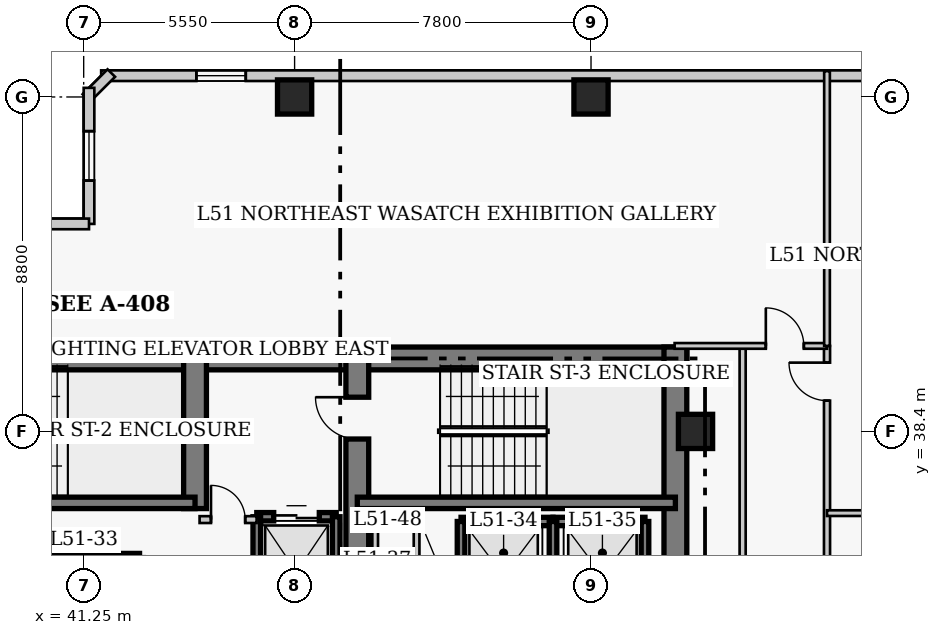
"""IFC4 building model, lengths in metres.
Left out: names, types, materials, properties, quantities, classifications, styles, units other than length and angle.
Written with IfcOpenShell. Run it as: python <this file> out.ifc"""

import sys

from ifc_helpers import new_model, si_unit, direction, frame, frame_2d, origin, origin_2d, place, context, subcontext, project, spatial, rectangle, extrude, element, fill, save


model = new_model("IFC4")
c1 = context("Model", 3, precision=1e-05, world=origin(), true_north=direction((0.0, 1.0)))
c2 = subcontext(c1, "Body", "Model", "MODEL_VIEW")
j1 = project(units=[si_unit("LENGTHUNIT", "METRE"), si_unit("PLANEANGLEUNIT", "RADIAN")], contexts=[c1])
p1 = place(None, origin())
s1 = spatial("IfcSite", under=j1, at=p1, CompositionType="ELEMENT")
p2 = place(p1, origin())
s2 = spatial("IfcBuilding", under=s1, at=p2, CompositionType="ELEMENT")
p3 = place(p2, frame((0.0, 0.0, 204.6)))
s3 = spatial("IfcBuildingStorey", under=s2, at=p3, CompositionType="ELEMENT", Elevation=204.6)
p4 = place(p3, frame((35.85, 40.32, 0.0), z_axis=(0.0, 0.0, 1.0), x_axis=(1.0, 0.0, 0.0)))
e1 = element("IfcWall", 1, at=p4, inside=s3, PredefinedType="SHEAR", context=c2, shape_type="SweptSolid", body=[
    extrude(rectangle(XDim=12.6, YDim=0.6, at=frame_2d((6.3, 0.0))), origin(), (0.0, 0.0, 1.0), 3.9),
])
p5 = place(p3, frame((48.45, 40.32, 0.0), z_axis=(0.0, 0.0, 1.0), x_axis=(1.0, 0.0, 0.0)))
e2 = element("IfcWall", 2, at=p5, inside=s3, PredefinedType="SHEAR", context=c2, shape_type="SweptSolid", body=[
    extrude(rectangle(XDim=8.67, YDim=0.6, at=frame_2d((4.335, 0.0))), origin(), (0.0, 0.0, 1.0), 3.9),
])
p6 = place(p3, frame((56.82, 27.05, 0.0), z_axis=(0.0, 0.0, 1.0), x_axis=(0.0, 1.0, 0.0)))
e3 = element("IfcWall", 3, at=p6, inside=s3, PredefinedType="SHEAR", context=c2, shape_type="SweptSolid", body=[
    extrude(rectangle(XDim=13.57, YDim=0.6, at=frame_2d((6.785, 0.0))), origin(), (0.0, 0.0, 1.0), 3.9),
])
p7 = place(p3, frame((44.18, 36.37, 0.0), z_axis=(0.0, 0.0, 1.0), x_axis=(0.0, 1.0, 0.0)))
e4 = element("IfcWall", 4, at=p7, inside=s3, PredefinedType="SHEAR", context=c2, shape_type="SweptSolid", body=[
    extrude(rectangle(XDim=3.95, YDim=0.6, at=frame_2d((1.975, 0.0))), origin(), (0.0, 0.0, 1.0), 3.9),
])
p8 = place(p3, frame((48.45, 32.45, 0.0), z_axis=(0.0, 0.0, 1.0), x_axis=(0.0, 1.0, 0.0)))
e5 = element("IfcWall", 5, at=p8, inside=s3, PredefinedType="SHEAR", context=c2, shape_type="SweptSolid", body=[
    extrude(rectangle(XDim=7.87, YDim=0.6, at=frame_2d((3.935, 0.0))), origin(), (0.0, 0.0, 1.0), 3.9),
])
p9 = place(p8, frame((5.75, 0.0, 0.0)))
e6 = element("IfcOpeningElement", 6, at=p9, cuts=e5, PredefinedType="OPENING", context=c2, shape_type="SweptSolid", body=[
    extrude(rectangle(XDim=1.1, YDim=2.15, at=frame_2d((0.55, 1.075))), frame((0.0, 0.31, 0.0), z_axis=(0.0, -1.0, 0.0), x_axis=(1.0, 0.0, 0.0)), (0.0, 0.0, 1.0), 0.62),
])
p10 = place(p3, frame((35.85, 36.52, 0.0), z_axis=(0.0, 0.0, 1.0), x_axis=(1.0, 0.0, 0.0)))
e7 = element("IfcWall", 7, at=p10, inside=s3, PredefinedType="SHEAR", context=c2, shape_type="SweptSolid", body=[
    extrude(rectangle(XDim=8.33, YDim=0.3, at=frame_2d((4.165, 0.0))), origin(), (0.0, 0.0, 1.0), 3.9),
])
p11 = place(p3, frame((48.45, 36.52, 0.0), z_axis=(0.0, 0.0, 1.0), x_axis=(1.0, 0.0, 0.0)))
e8 = element("IfcWall", 8, at=p11, inside=s3, PredefinedType="SHEAR", context=c2, shape_type="SweptSolid", body=[
    extrude(rectangle(XDim=8.37, YDim=0.3, at=frame_2d((4.185, 0.0))), origin(), (0.0, 0.0, 1.0), 3.9),
])
for number, where, z_axis, x_axis in (
    (9, (46.8, 47.2, 0.0), (0.0, 0.0, 1.0), (1.0, 0.0, 0.0)),
    (10, (54.6, 47.2, 0.0), (0.0, 0.0, 1.0), (1.0, 0.0, 0.0)),
    (11, (57.35, 38.4, 0.0), (0.0, 0.0, 1.0), (1.0, 0.0, 0.0)),
):
    element("IfcColumn", number, at=place(p3, frame(where, z_axis=z_axis, x_axis=x_axis)), inside=s3, PredefinedType="COLUMN", context=c2, shape_type="SweptSolid", body=[
        extrude(rectangle(XDim=0.9, YDim=0.9, at=origin_2d()), origin(), (0.0, 0.0, 1.0), 3.9),
    ])
p12 = place(p3, frame((67.54, 47.76, 0.0), z_axis=(0.0, 0.0, 1.0), x_axis=(-1.0, 0.0, 0.0)))
e12 = element("IfcWall", 12, at=p12, inside=s3, PredefinedType="SOLIDWALL", context=c2, shape_type="SweptSolid", body=[
    extrude(rectangle(XDim=25.83, YDim=0.28, at=frame_2d((12.915, 0.0))), origin(), (0.0, 0.0, 1.0), 3.65),
])
p13 = place(p12, frame((3.655, 0.0, 0.85)))
e13 = element("IfcOpeningElement", 13, at=p13, cuts=e12, PredefinedType="OPENING", context=c2, shape_type="SweptSolid", body=[
    extrude(rectangle(XDim=1.3, YDim=1.7, at=frame_2d((0.65, 0.85))), frame((0.0, 0.15, 0.0), z_axis=(0.0, -1.0, 0.0), x_axis=(1.0, 0.0, 0.0)), (0.0, 0.0, 1.0), 0.3),
])
p14 = place(p12, frame((22.025, 0.0, 0.85)))
e14 = element("IfcOpeningElement", 14, at=p14, cuts=e12, PredefinedType="OPENING", context=c2, shape_type="SweptSolid", body=[
    extrude(rectangle(XDim=1.3, YDim=1.7, at=frame_2d((0.65, 0.85))), frame((0.0, 0.15, 0.0), z_axis=(0.0, -1.0, 0.0), x_axis=(1.0, 0.0, 0.0)), (0.0, 0.0, 1.0), 0.3),
])
p15 = place(p3, frame((41.977, 47.829, 0.0), z_axis=(0.0, 0.0, 1.0), x_axis=(-0.706975312048, -0.707238225886, 0.0)))
e15 = element("IfcWall", 15, at=p15, inside=s3, PredefinedType="SOLIDWALL", context=c2, shape_type="SweptSolid", body=[
    extrude(rectangle(XDim=0.929, YDim=0.28, at=frame_2d((0.464, 0.0))), origin(), (0.0, 0.0, 1.0), 3.65),
])
p16 = place(p3, frame((41.39, 47.44, 0.0), z_axis=(0.0, 0.0, 1.0), x_axis=(0.0, -1.0, 0.0)))
e16 = element("IfcWall", 16, at=p16, inside=s3, PredefinedType="SOLIDWALL", context=c2, shape_type="SweptSolid", body=[
    extrude(rectangle(XDim=3.58, YDim=0.28, at=frame_2d((1.79, 0.0))), origin(), (0.0, 0.0, 1.0), 3.65),
])
p17 = place(p16, frame((1.14, 0.0, 0.85)))
e17 = element("IfcOpeningElement", 17, at=p17, cuts=e16, PredefinedType="OPENING", context=c2, shape_type="SweptSolid", body=[
    extrude(rectangle(XDim=1.3, YDim=1.7, at=frame_2d((0.65, 0.85))), frame((0.0, 0.15, 0.0), z_axis=(0.0, -1.0, 0.0), x_axis=(1.0, 0.0, 0.0)), (0.0, 0.0, 1.0), 0.3),
])
p18 = place(p3, frame((41.39, 43.86, 0.0), z_axis=(0.0, 0.0, 1.0), x_axis=(-1.0, 0.0, 0.0)))
e18 = element("IfcWall", 18, at=p18, inside=s3, PredefinedType="SOLIDWALL", context=c2, shape_type="SweptSolid", body=[
    extrude(rectangle(XDim=4.78, YDim=0.28, at=frame_2d((2.39, 0.0))), origin(), (0.0, 0.0, 1.0), 3.65),
])
p19 = place(p18, frame((1.74, 0.0, 0.85)))
e19 = element("IfcOpeningElement", 19, at=p19, cuts=e18, PredefinedType="OPENING", context=c2, shape_type="SweptSolid", body=[
    extrude(rectangle(XDim=1.3, YDim=1.7, at=frame_2d((0.65, 0.85))), frame((0.0, 0.15, 0.0), z_axis=(0.0, -1.0, 0.0), x_axis=(1.0, 0.0, 0.0)), (0.0, 0.0, 1.0), 0.3),
])
p20 = place(p3, frame((40.4, 35.08, 0.0), z_axis=(0.0, 0.0, 1.0), x_axis=(1.0, 0.0, 0.0)))
e20 = element("IfcWall", 20, at=p20, inside=s3, PredefinedType="SHEAR", context=c2, shape_type="SweptSolid", body=[
    extrude(rectangle(XDim=2.32, YDim=0.22, at=frame_2d((1.16, 0.0))), origin(), (0.0, 0.0, 1.0), 3.9),
])
p21 = place(p3, frame((51.18, 36.03, 0.0), z_axis=(0.0, 0.0, 1.0), x_axis=(1.0, 0.0, 0.0)))
e21 = element("IfcWall", 21, at=p21, inside=s3, PredefinedType="SHEAR", context=c2, shape_type="SweptSolid", body=[
    extrude(rectangle(XDim=2.42, YDim=0.22, at=frame_2d((1.21, 0.0))), origin(), (0.0, 0.0, 1.0), 3.9),
])
p22 = place(p3, frame((51.18, 33.17, 0.0), z_axis=(0.0, 0.0, 1.0), x_axis=(0.0, 1.0, 0.0)))
e22 = element("IfcWall", 22, at=p22, inside=s3, PredefinedType="SHEAR", context=c2, shape_type="SweptSolid", body=[
    extrude(rectangle(XDim=2.86, YDim=0.2, at=frame_2d((1.43, 0.0))), origin(), (0.0, 0.0, 1.0), 3.9),
])
p23 = place(p3, frame((53.6, 36.03, 0.0), z_axis=(0.0, 0.0, 1.0), x_axis=(1.0, 0.0, 0.0)))
e23 = element("IfcWall", 23, at=p23, inside=s3, PredefinedType="SHEAR", context=c2, shape_type="SweptSolid", body=[
    extrude(rectangle(XDim=2.42, YDim=0.22, at=frame_2d((1.21, 0.0))), origin(), (0.0, 0.0, 1.0), 3.9),
])
for number, where, z_axis, x_axis in (
    (24, (53.6, 33.17, 0.0), (0.0, 0.0, 1.0), (0.0, 1.0, 0.0)),
    (25, (56.02, 33.17, 0.0), (0.0, 0.0, 1.0), (0.0, 1.0, 0.0)),
):
    element("IfcWall", number, at=place(p3, frame(where, z_axis=z_axis, x_axis=x_axis)), inside=s3, PredefinedType="SHEAR", context=c2, shape_type="SweptSolid", body=[
        extrude(rectangle(XDim=2.86, YDim=0.2, at=frame_2d((1.43, 0.0))), origin(), (0.0, 0.0, 1.0), 3.9),
    ])
p24 = place(p3, frame((45.805, 36.155, 0.0), z_axis=(0.0, 0.0, 1.0), x_axis=(1.0, 0.0, 0.0)))
e26 = element("IfcWall", 26, at=p24, inside=s3, PredefinedType="SHEAR", context=c2, shape_type="SweptSolid", body=[
    extrude(rectangle(XDim=2.09, YDim=0.22, at=frame_2d((1.045, 0.0))), origin(), (0.0, 0.0, 1.0), 3.9),
])
p25 = place(p24, frame((0.445, 0.0, 0.0)))
e27 = element("IfcOpeningElement", 27, at=p25, cuts=e26, PredefinedType="OPENING", context=c2, shape_type="SweptSolid", body=[
    extrude(rectangle(XDim=1.2, YDim=2.15, at=frame_2d((0.6, 1.075))), frame((0.0, 0.12, 0.0), z_axis=(0.0, -1.0, 0.0), x_axis=(1.0, 0.0, 0.0)), (0.0, 0.0, 1.0), 0.24),
])
p26 = place(p3, frame((45.805, 32.65, 0.0), z_axis=(0.0, 0.0, 1.0), x_axis=(0.0, 1.0, 0.0)))
e28 = element("IfcWall", 28, at=p26, inside=s3, PredefinedType="SHEAR", context=c2, shape_type="SweptSolid", body=[
    extrude(rectangle(XDim=3.505, YDim=0.2, at=frame_2d((1.752, 0.0))), origin(), (0.0, 0.0, 1.0), 3.9),
])
p27 = place(p3, frame((47.895, 33.245, 0.0), z_axis=(0.0, 0.0, 1.0), x_axis=(0.0, 1.0, 0.0)))
e29 = element("IfcWall", 29, at=p27, inside=s3, PredefinedType="SHEAR", context=c2, shape_type="SweptSolid", body=[
    extrude(rectangle(XDim=2.91, YDim=0.2, at=frame_2d((1.455, 0.0))), origin(), (0.0, 0.0, 1.0), 3.9),
])
p28 = place(p3, frame((44.3, 36.08, 0.0), z_axis=(0.0, 0.0, 1.0), x_axis=(1.0, 0.0, 0.0)))
e30 = element("IfcWall", 30, at=p28, inside=s3, PredefinedType="PARTITIONING", context=c2, shape_type="SweptSolid", body=[
    extrude(rectangle(XDim=1.5, YDim=0.18, at=frame_2d((0.75, 0.0))), origin(), (0.0, 0.0, 1.0), 3.65),
])
p29 = place(p28, frame((0.3, 0.0, 0.0)))
e31 = element("IfcOpeningElement", 31, at=p29, cuts=e30, PredefinedType="OPENING", context=c2, shape_type="SweptSolid", body=[
    extrude(rectangle(XDim=0.9, YDim=2.15, at=frame_2d((0.45, 1.075))), frame((0.0, 0.1, 0.0), z_axis=(0.0, -1.0, 0.0), x_axis=(1.0, 0.0, 0.0)), (0.0, 0.0, 1.0), 0.2),
])
for number, where, z_axis, x_axis in (
    (32, (48.92, 32.75, 0.0), (0.0, 0.0, 1.0), (0.0, 1.0, 0.0)),
    (33, (50.01, 32.75, 0.0), (0.0, 0.0, 1.0), (0.0, 1.0, 0.0)),
):
    element("IfcWall", number, at=place(p3, frame(where, z_axis=z_axis, x_axis=x_axis)), inside=s3, PredefinedType="PARTITIONING", context=c2, shape_type="SweptSolid", body=[
        extrude(rectangle(XDim=3.62, YDim=0.15, at=frame_2d((1.81, 0.0))), origin(), (0.0, 0.0, 1.0), 3.65),
    ])
p30 = place(p3, frame((60.81, 11.95, 0.0), z_axis=(0.0, 0.0, 1.0), x_axis=(0.0, 1.0, 0.0)))
e34 = element("IfcWall", 34, at=p30, inside=s3, PredefinedType="PARTITIONING", context=c2, shape_type="SweptSolid", body=[
    extrude(rectangle(XDim=28.7, YDim=0.16, at=frame_2d((14.35, 0.0))), origin(), (0.0, 0.0, 1.0), 3.65),
])
p31 = place(p30, frame((3.55, 0.0, 0.0)))
e35 = element("IfcOpeningElement", 35, at=p31, cuts=e34, PredefinedType="OPENING", context=c2, shape_type="SweptSolid", body=[
    extrude(rectangle(XDim=0.95, YDim=2.1, at=frame_2d((0.475, 1.05))), frame((0.0, 0.09, 0.0), z_axis=(0.0, -1.0, 0.0), x_axis=(1.0, 0.0, 0.0)), (0.0, 0.0, 1.0), 0.18),
])
p32 = place(p30, frame((9.409, 0.0, 0.0)))
e36 = element("IfcOpeningElement", 36, at=p32, cuts=e34, PredefinedType="OPENING", context=c2, shape_type="SweptSolid", body=[
    extrude(rectangle(XDim=0.95, YDim=2.1, at=frame_2d((0.475, 1.05))), frame((0.0, 0.09, 0.0), z_axis=(0.0, -1.0, 0.0), x_axis=(1.0, 0.0, 0.0)), (0.0, 0.0, 1.0), 0.18),
])
p33 = place(p30, frame((27.26, 0.0, 0.0)))
e37 = element("IfcOpeningElement", 37, at=p33, cuts=e34, PredefinedType="OPENING", context=c2, shape_type="SweptSolid", body=[
    extrude(rectangle(XDim=1.0, YDim=2.15, at=frame_2d((0.5, 1.075))), frame((0.0, 0.09, 0.0), z_axis=(0.0, -1.0, 0.0), x_axis=(1.0, 0.0, 0.0)), (0.0, 0.0, 1.0), 0.18),
])
p34 = place(p3, frame((58.59, 16.86, 0.0), z_axis=(0.0, 0.0, 1.0), x_axis=(0.0, 1.0, 0.0)))
e38 = element("IfcWall", 38, at=p34, inside=s3, PredefinedType="PARTITIONING", context=c2, shape_type="SweptSolid", body=[
    extrude(rectangle(XDim=23.79, YDim=0.16, at=frame_2d((11.895, 0.0))), origin(), (0.0, 0.0, 1.0), 3.246),
])
p35 = place(p3, frame((56.8, 40.65, 0.0), z_axis=(0.0, 0.0, 1.0), x_axis=(1.0, 0.0, 0.0)))
e39 = element("IfcWall", 39, at=p35, inside=s3, PredefinedType="PARTITIONING", context=c2, shape_type="SweptSolid", body=[
    extrude(rectangle(XDim=4.01, YDim=0.15, at=frame_2d((2.005, 0.0))), origin(), (0.0, 0.0, 1.0), 3.65),
])
p36 = place(p35, frame((2.4, 0.0, 0.0)))
e40 = element("IfcOpeningElement", 40, at=p36, cuts=e39, PredefinedType="OPENING", context=c2, shape_type="SweptSolid", body=[
    extrude(rectangle(XDim=1.0, YDim=2.15, at=frame_2d((0.5, 1.075))), frame((0.0, 0.085, 0.0), z_axis=(0.0, -1.0, 0.0), x_axis=(1.0, 0.0, 0.0)), (0.0, 0.0, 1.0), 0.17),
])
p37 = place(p3, frame((60.81, 40.65, 0.0), z_axis=(0.0, 0.0, 1.0), x_axis=(0.0, 1.0, 0.0)))
e41 = element("IfcWall", 41, at=p37, inside=s3, PredefinedType="PARTITIONING", context=c2, shape_type="SweptSolid", body=[
    extrude(rectangle(XDim=7.23, YDim=0.15, at=frame_2d((3.615, 0.0))), origin(), (0.0, 0.0, 1.0), 3.65),
])
p38 = place(p3, frame((60.81, 36.25, 0.0), z_axis=(0.0, 0.0, 1.0), x_axis=(1.0, 0.0, 0.0)))
e42 = element("IfcWall", 42, at=p38, inside=s3, PredefinedType="PARTITIONING", context=c2, shape_type="SweptSolid", body=[
    extrude(rectangle(XDim=4.29, YDim=0.15, at=frame_2d((2.145, 0.0))), origin(), (0.0, 0.0, 1.0), 3.65),
])
p39 = place(p14, origin())
e43 = element("IfcWindow", 43, at=p39, inside=s3, PartitioningType="SINGLE_PANEL", PredefinedType="WINDOW", context=c2, shape_type="SweptSolid", body=[
    extrude(rectangle(XDim=1.3, YDim=1.7, at=frame_2d((0.65, 0.85))), frame((0.0, 0.03, 0.0), z_axis=(0.0, -1.0, 0.0), x_axis=(1.0, 0.0, 0.0)), (0.0, 0.0, 1.0), 0.06),
])
fill(e14, e43)
p40 = place(p17, origin())
e44 = element("IfcWindow", 44, at=p40, inside=s3, PartitioningType="SINGLE_PANEL", PredefinedType="WINDOW", context=c2, shape_type="SweptSolid", body=[
    extrude(rectangle(XDim=1.3, YDim=1.7, at=frame_2d((0.65, 0.85))), frame((0.0, 0.03, 0.0), z_axis=(0.0, -1.0, 0.0), x_axis=(1.0, 0.0, 0.0)), (0.0, 0.0, 1.0), 0.06),
])
fill(e17, e44)
p41 = place(p25, origin())
e45 = element("IfcDoor", 45, at=p41, inside=s3, OperationType="DOUBLE_DOOR_SLIDING", PredefinedType="DOOR", context=c2, shape_type="SweptSolid", body=[
    extrude(rectangle(XDim=1.2, YDim=2.15, at=frame_2d((0.6, 1.075))), frame((0.0, 0.025, 0.0), z_axis=(0.0, -1.0, 0.0), x_axis=(1.0, 0.0, 0.0)), (0.0, 0.0, 1.0), 0.05),
])
fill(e27, e45)
p42 = place(p29, origin())
e46 = element("IfcDoor", 46, at=p42, inside=s3, OperationType="SINGLE_SWING_LEFT", PredefinedType="DOOR", context=c2, shape_type="SweptSolid", body=[
    extrude(rectangle(XDim=0.9, YDim=2.15, at=frame_2d((0.45, 1.075))), frame((0.0, 0.025, 0.0), z_axis=(0.0, -1.0, 0.0), x_axis=(1.0, 0.0, 0.0)), (0.0, 0.0, 1.0), 0.05),
])
fill(e31, e46)
p43 = place(p36, origin())
e47 = element("IfcDoor", 47, at=p43, inside=s3, OperationType="SINGLE_SWING_LEFT", PredefinedType="DOOR", context=c2, shape_type="SweptSolid", body=[
    extrude(rectangle(XDim=1.0, YDim=2.15, at=frame_2d((0.5, 1.075))), frame((0.0, 0.025, 0.0), z_axis=(0.0, -1.0, 0.0), x_axis=(1.0, 0.0, 0.0)), (0.0, 0.0, 1.0), 0.05),
])
fill(e40, e47)
p44 = place(p33, origin())
e48 = element("IfcDoor", 48, at=p44, inside=s3, OperationType="SINGLE_SWING_RIGHT", PredefinedType="DOOR", context=c2, shape_type="SweptSolid", body=[
    extrude(rectangle(XDim=1.0, YDim=2.15, at=frame_2d((0.5, 1.075))), frame((0.0, 0.025, 0.0), z_axis=(0.0, -1.0, 0.0), x_axis=(1.0, 0.0, 0.0)), (0.0, 0.0, 1.0), 0.05),
])
fill(e37, e48)
p45 = place(p9, origin())
e49 = element("IfcDoor", 49, at=p45, inside=s3, OperationType="SINGLE_SWING_RIGHT", PredefinedType="DOOR", context=c2, shape_type="SweptSolid", body=[
    extrude(rectangle(XDim=1.1, YDim=2.15, at=frame_2d((0.55, 1.075))), frame((0.0, 0.025, 0.0), z_axis=(0.0, -1.0, 0.0), x_axis=(1.0, 0.0, 0.0)), (0.0, 0.0, 1.0), 0.05),
])
fill(e6, e49)
save(model, sys.argv[1])
